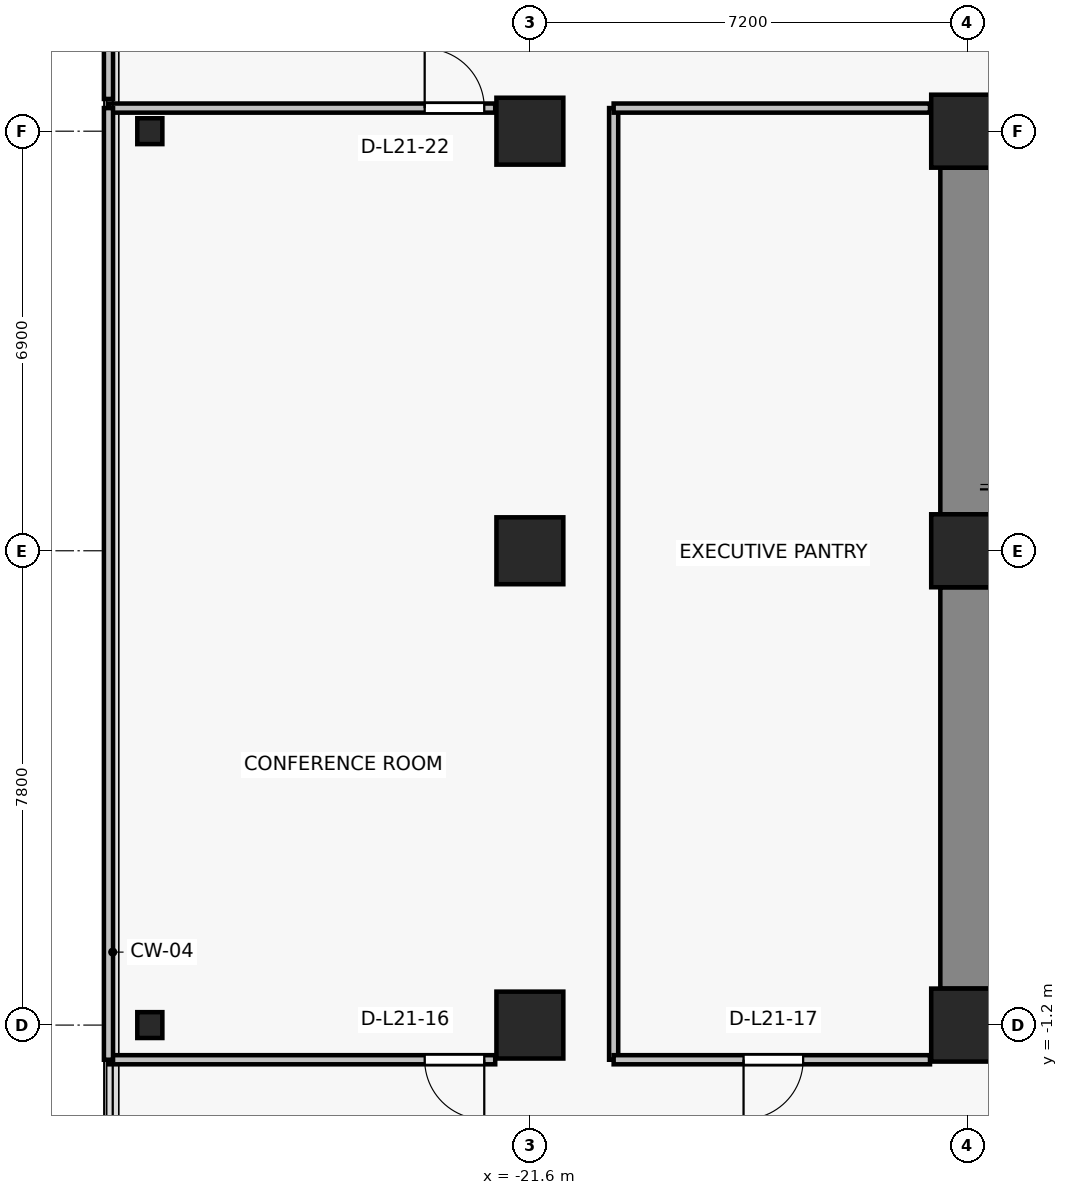
"""IFC4 building model, lengths in metres.
Left out: names, types, materials, properties, quantities, classifications, styles, units other than length and angle.
Written with IfcOpenShell. Run it as: python <this file> out.ifc"""

import sys

from ifc_helpers import new_model, si_unit, direction, frame, frame_2d, origin, origin_2d, place, context, subcontext, project, spatial, rectangle, i_section, extrude, source, transform, mapped, element, fill, save


model = new_model("IFC4")
c1 = context("Model", 3, precision=1e-05, world=origin(), true_north=direction((0.0, 1.0)))
c2 = subcontext(c1, "Body", "Model", "MODEL_VIEW")
j1 = project(units=[si_unit("LENGTHUNIT", "METRE"), si_unit("PLANEANGLEUNIT", "RADIAN")], contexts=[c1])
p1 = place(None, origin())
s1 = spatial("IfcSite", under=j1, at=p1, CompositionType="ELEMENT")
p2 = place(p1, origin())
s2 = spatial("IfcBuilding", under=s1, at=p2, CompositionType="ELEMENT")
p3 = place(p2, frame((0.0, 0.0, 76.9)))
s3 = spatial("IfcBuildingStorey", under=s2, at=p3, CompositionType="ELEMENT", Elevation=76.9)
for number, where, z_axis, x_axis in (
    (1, (-14.4, -1.2, 0.0), (0.0, 0.0, 1.0), (1.0, 0.0, 0.0)),
    (2, (-14.4, 6.6, 0.0), (0.0, 0.0, 1.0), (1.0, 0.0, 0.0)),
    (3, (-14.4, 13.5, 0.0), (0.0, 0.0, 1.0), (1.0, 0.0, 0.0)),
):
    element("IfcColumn", number, at=place(p3, frame(where, z_axis=z_axis, x_axis=x_axis)), inside=s3, PredefinedType="COLUMN", context=c2, shape_type="SweptSolid", body=[
        extrude(rectangle(XDim=1.2, YDim=1.2, at=origin_2d()), origin(), (0.0, 0.0, 1.0), 3.3),
    ])
for number, where, z_axis, x_axis in (
    (4, (-21.6, -1.2, 0.0), (0.0, 0.0, 1.0), (1.0, 0.0, 0.0)),
    (5, (-21.6, 6.6, 0.0), (0.0, 0.0, 1.0), (1.0, 0.0, 0.0)),
    (6, (-21.6, 13.5, 0.0), (0.0, 0.0, 1.0), (1.0, 0.0, 0.0)),
):
    element("IfcColumn", number, at=place(p3, frame(where, z_axis=z_axis, x_axis=x_axis)), inside=s3, PredefinedType="COLUMN", context=c2, shape_type="SweptSolid", body=[
        extrude(rectangle(XDim=1.1, YDim=1.1, at=origin_2d()), origin(), (0.0, 0.0, 1.0), 3.3),
    ])
for number, where, z_axis, x_axis in (
    (7, (-27.85, -1.2, 0.0), (0.0, 0.0, 1.0), (1.0, 0.0, 0.0)),
    (8, (-27.85, 13.5, 0.0), (0.0, 0.0, 1.0), (1.0, 0.0, 0.0)),
):
    element("IfcColumn", number, at=place(p3, frame(where, z_axis=z_axis, x_axis=x_axis)), inside=s3, PredefinedType="COLUMN", context=c2, shape_type="SweptSolid", body=[
        extrude(i_section(OverallWidth=0.412, OverallDepth=0.425, WebThickness=0.026, FlangeThickness=0.039, FilletRadius=0.015, at=origin_2d()), origin(), (0.0, 0.0, 1.0), 3.3),
    ])
p4 = place(p3, frame((-14.4, -0.6, 0.0), z_axis=(0.0, 0.0, 1.0), x_axis=(0.0, 1.0, 0.0)))
e9 = element("IfcWall", 9, at=p4, inside=s3, PredefinedType="SHEAR", context=c2, shape_type="SweptSolid", body=[
    extrude(rectangle(XDim=6.6, YDim=0.9, at=frame_2d((3.3, 0.0))), origin(), (0.0, 0.0, 1.0), 3.05),
])
p5 = place(p3, frame((-14.4, 7.2, 0.0), z_axis=(0.0, 0.0, 1.0), x_axis=(0.0, 1.0, 0.0)))
e10 = element("IfcWall", 10, at=p5, inside=s3, PredefinedType="SHEAR", context=c2, shape_type="SweptSolid", body=[
    extrude(rectangle(XDim=5.7, YDim=0.9, at=frame_2d((2.85, 0.0))), origin(), (0.0, 0.0, 1.0), 3.05),
])
p6 = place(p3, frame((-22.17, -1.77, 0.0), z_axis=(0.0, 0.0, 1.0), x_axis=(-1.0, 0.0, 0.0)))
e11 = element("IfcWall", 11, at=p6, inside=s3, PredefinedType="PARTITIONING", context=c2, shape_type="SweptSolid", body=[
    extrude(rectangle(XDim=6.36, YDim=0.15, at=frame_2d((3.18, 0.0))), origin(), (0.0, 0.0, 1.0), 2.44),
])
p7 = place(p6, frame((0.18, 0.0, 0.0)))
e12 = element("IfcOpeningElement", 12, at=p7, cuts=e11, PredefinedType="OPENING", context=c2, shape_type="SweptSolid", body=[
    extrude(rectangle(XDim=0.98, YDim=2.15, at=frame_2d((0.49, 1.075))), frame((0.0, 0.085, 0.0), z_axis=(0.0, -1.0, 0.0), x_axis=(1.0, 0.0, 0.0)), (0.0, 0.0, 1.0), 0.17),
])
p8 = place(p3, frame((-28.53, 13.88, 0.0), z_axis=(0.0, 0.0, 1.0), x_axis=(1.0, 0.0, 0.0)))
e13 = element("IfcWall", 13, at=p8, inside=s3, PredefinedType="PARTITIONING", context=c2, shape_type="SweptSolid", body=[
    extrude(rectangle(XDim=6.36, YDim=0.15, at=frame_2d((3.18, 0.0))), origin(), (0.0, 0.0, 1.0), 3.05),
])
p9 = place(p8, frame((5.2, 0.0, 0.0)))
e14 = element("IfcOpeningElement", 14, at=p9, cuts=e13, PredefinedType="OPENING", context=c2, shape_type="SweptSolid", body=[
    extrude(rectangle(XDim=0.98, YDim=2.15, at=frame_2d((0.49, 1.075))), frame((0.0, 0.085, 0.0), z_axis=(0.0, -1.0, 0.0), x_axis=(1.0, 0.0, 0.0)), (0.0, 0.0, 1.0), 0.17),
])
p10 = place(p3, frame((-28.53, -1.77, 0.0), z_axis=(0.0, 0.0, 1.0), x_axis=(0.0, 1.0, 0.0)))
e15 = element("IfcWall", 15, at=p10, inside=s3, PredefinedType="PARTITIONING", context=c2, shape_type="SweptSolid", body=[
    extrude(rectangle(XDim=15.65, YDim=0.15, at=frame_2d((7.825, 0.0))), origin(), (0.0, 0.0, 1.0), 3.05),
])
p11 = place(p3, frame((-20.222, 13.88, 0.0), z_axis=(0.0, 0.0, 1.0), x_axis=(0.0, -1.0, 0.0)))
e16 = element("IfcWall", 16, at=p11, inside=s3, PredefinedType="PARTITIONING", context=c2, shape_type="SweptSolid", body=[
    extrude(rectangle(XDim=15.65, YDim=0.15, at=frame_2d((7.825, 0.0))), origin(), (0.0, 0.0, 1.0), 2.44),
])
p12 = place(p3, frame((-15.02, -1.77, 0.0), z_axis=(0.0, 0.0, 1.0), x_axis=(-1.0, 0.0, 0.0)))
e17 = element("IfcWall", 17, at=p12, inside=s3, PredefinedType="PARTITIONING", context=c2, shape_type="SweptSolid", body=[
    extrude(rectangle(XDim=5.202, YDim=0.15, at=frame_2d((2.601, 0.0))), origin(), (0.0, 0.0, 1.0), 3.05),
])
p13 = place(p12, frame((2.086, 0.0, 0.0)))
e18 = element("IfcOpeningElement", 18, at=p13, cuts=e17, PredefinedType="OPENING", context=c2, shape_type="SweptSolid", body=[
    extrude(rectangle(XDim=0.98, YDim=2.15, at=frame_2d((0.49, 1.075))), frame((0.0, 0.085, 0.0), z_axis=(0.0, -1.0, 0.0), x_axis=(1.0, 0.0, 0.0)), (0.0, 0.0, 1.0), 0.17),
])
p14 = place(p3, frame((-20.222, 13.88, 0.0), z_axis=(0.0, 0.0, 1.0), x_axis=(1.0, 0.0, 0.0)))
e19 = element("IfcWall", 19, at=p14, inside=s3, PredefinedType="PARTITIONING", context=c2, shape_type="SweptSolid", body=[
    extrude(rectangle(XDim=5.202, YDim=0.15, at=frame_2d((2.601, 0.0))), origin(), (0.0, 0.0, 1.0), 3.05),
])
p15 = place(p3, frame((-28.53, 14.03, 0.0), z_axis=(0.0, 0.0, 1.0), x_axis=(0.0, 1.0, 0.0)))
e20 = element("IfcWall", 20, at=p15, inside=s3, PredefinedType="PARTITIONING", context=c2, shape_type="SweptSolid", body=[
    extrude(rectangle(XDim=4.1, YDim=0.15, at=frame_2d((2.05, 0.0))), origin(), (0.0, 0.0, 1.0), 3.05),
])
m1 = source(origin(), c2, "Body", "SweptSolid", [
    extrude(rectangle(XDim=0.98, YDim=2.15, at=frame_2d((0.49, 1.075))), frame((0.0, 0.025, 0.0), z_axis=(0.0, -1.0, 0.0), x_axis=(1.0, 0.0, 0.0)), (0.0, 0.0, 1.0), 0.05),
])
p16 = place(p7, origin())
e21 = element("IfcDoor", 21, at=p16, inside=s3, OperationType="SINGLE_SWING_LEFT", PredefinedType="DOOR", context=c2, shape_type="MappedRepresentation", body=[
    mapped(m1, transform((0.0, 0.0, 0.0), x_axis=(1.0, 0.0, 0.0), y_axis=(0.0, 1.0, 0.0), z_axis=(0.0, 0.0, 1.0), scale=1.0)),
])
fill(e12, e21)
p17 = place(p13, origin())
e22 = element("IfcDoor", 22, at=p17, inside=s3, OperationType="SINGLE_SWING_RIGHT", PredefinedType="DOOR", context=c2, shape_type="MappedRepresentation", body=[
    mapped(m1, transform((0.0, 0.0, 0.0), x_axis=(1.0, 0.0, 0.0), y_axis=(0.0, 1.0, 0.0), z_axis=(0.0, 0.0, 1.0), scale=1.0)),
])
fill(e18, e22)
p18 = place(p9, origin())
e23 = element("IfcDoor", 23, at=p18, inside=s3, OperationType="SINGLE_SWING_LEFT", PredefinedType="DOOR", context=c2, shape_type="MappedRepresentation", body=[
    mapped(m1, transform((0.0, 0.0, 0.0), x_axis=(1.0, 0.0, 0.0), y_axis=(0.0, 1.0, 0.0), z_axis=(0.0, 0.0, 1.0), scale=1.0)),
])
fill(e14, e23)
save(model, sys.argv[1])
